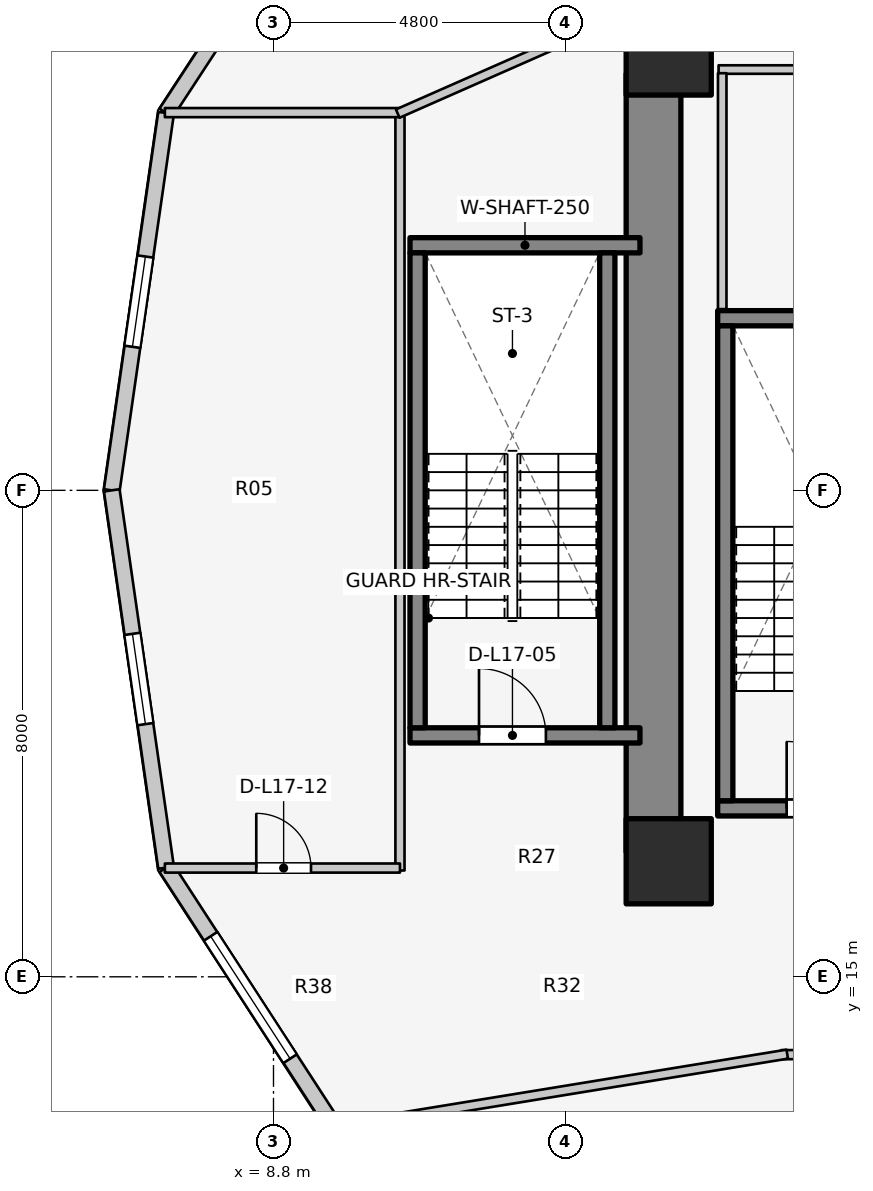
"""IFC4 building model, lengths in metres.
Left out: names, types, materials, properties, quantities, classifications, styles, units other than length and angle.
Written with IfcOpenShell. Run it as: python <this file> out.ifc"""

import sys

from ifc_helpers import new_model, si_unit, direction, frame, frame_2d, origin, origin_2d, place, context, subcontext, project, spatial, rectangle, extrude, element, fill, save


model = new_model("IFC4")
c1 = context("Model", 3, precision=1e-05, world=origin(), true_north=direction((0.0, 1.0)))
c2 = subcontext(c1, "Body", "Model", "MODEL_VIEW")
j1 = project(units=[si_unit("LENGTHUNIT", "METRE"), si_unit("PLANEANGLEUNIT", "RADIAN")], contexts=[c1])
p1 = place(None, origin())
s1 = spatial("IfcSite", under=j1, at=p1, CompositionType="ELEMENT")
p2 = place(p1, origin())
s2 = spatial("IfcBuilding", under=s1, at=p2, CompositionType="ELEMENT")
p3 = place(p2, frame((0.0, 0.0, 58.6)))
s3 = spatial("IfcBuildingStorey", under=s2, at=p3, CompositionType="ELEMENT", Elevation=58.6)
p4 = place(p3, frame((15.05, 17.05, 0.0), z_axis=(0.0, 0.0, 1.0), x_axis=(0.0, 1.0, 0.0)))
e1 = element("IfcWall", 1, at=p4, inside=s3, PredefinedType="SHEAR", context=c2, shape_type="SweptSolid", body=[
    extrude(rectangle(XDim=12.8, YDim=0.9, at=frame_2d((6.4, 0.0))), origin(), (0.0, 0.0, 1.0), 3.1),
])
p5 = place(p3, frame((16.105, 17.77, 0.0), z_axis=(0.0, 0.0, 1.0), x_axis=(1.0, 0.0, 0.0)))
e2 = element("IfcWall", 2, at=p5, inside=s3, PredefinedType="SOLIDWALL", context=c2, shape_type="SweptSolid", body=[
    extrude(rectangle(XDim=3.37, YDim=0.25, at=frame_2d((1.685, 0.0))), origin(), (0.0, 0.0, 1.0), 3.1),
])
p6 = place(p5, frame((1.135, 0.0, 0.0)))
e3 = element("IfcOpeningElement", 3, at=p6, cuts=e2, PredefinedType="OPENING", context=c2, shape_type="SweptSolid", body=[
    extrude(rectangle(XDim=1.1, YDim=2.1, at=frame_2d((0.55, 1.05))), frame((0.0, 0.135, 0.0), z_axis=(0.0, -1.0, 0.0), x_axis=(1.0, 0.0, 0.0)), (0.0, 0.0, 1.0), 0.27),
])
p7 = place(p3, frame((16.105, 25.83, 0.0), z_axis=(0.0, 0.0, 1.0), x_axis=(1.0, 0.0, 0.0)))
e4 = element("IfcWall", 4, at=p7, inside=s3, PredefinedType="SOLIDWALL", context=c2, shape_type="SweptSolid", body=[
    extrude(rectangle(XDim=3.37, YDim=0.25, at=frame_2d((1.685, 0.0))), origin(), (0.0, 0.0, 1.0), 3.1),
])
p8 = place(p3, frame((16.23, 17.895, 0.0), z_axis=(0.0, 0.0, 1.0), x_axis=(0.0, 1.0, 0.0)))
e5 = element("IfcWall", 5, at=p8, inside=s3, PredefinedType="SOLIDWALL", context=c2, shape_type="SweptSolid", body=[
    extrude(rectangle(XDim=7.81, YDim=0.25, at=frame_2d((3.905, 0.0))), origin(), (0.0, 0.0, 1.0), 3.1),
])
p9 = place(p3, frame((11.045, 18.97, 0.0), z_axis=(0.0, 0.0, 1.0), x_axis=(1.0, 0.0, 0.0)))
e6 = element("IfcWall", 6, at=p9, inside=s3, PredefinedType="SOLIDWALL", context=c2, shape_type="SweptSolid", body=[
    extrude(rectangle(XDim=3.782, YDim=0.25, at=frame_2d((1.891, 0.0))), origin(), (0.0, 0.0, 1.0), 3.1),
])
p10 = place(p9, frame((1.135, 0.0, 0.0)))
e7 = element("IfcOpeningElement", 7, at=p10, cuts=e6, PredefinedType="OPENING", context=c2, shape_type="SweptSolid", body=[
    extrude(rectangle(XDim=1.1, YDim=2.1, at=frame_2d((0.55, 1.05))), frame((0.0, 0.135, 0.0), z_axis=(0.0, -1.0, 0.0), x_axis=(1.0, 0.0, 0.0)), (0.0, 0.0, 1.0), 0.27),
])
p11 = place(p3, frame((11.045, 27.03, 0.0), z_axis=(0.0, 0.0, 1.0), x_axis=(1.0, 0.0, 0.0)))
e8 = element("IfcWall", 8, at=p11, inside=s3, PredefinedType="SOLIDWALL", context=c2, shape_type="SweptSolid", body=[
    extrude(rectangle(XDim=3.782, YDim=0.25, at=frame_2d((1.891, 0.0))), origin(), (0.0, 0.0, 1.0), 3.1),
])
for number, where, z_axis, x_axis in (
    (9, (11.17, 19.095, 0.0), (0.0, 0.0, 1.0), (0.0, 1.0, 0.0)),
    (10, (14.29, 19.095, 0.0), (0.0, 0.0, 1.0), (0.0, 1.0, 0.0)),
):
    element("IfcWall", number, at=place(p3, frame(where, z_axis=z_axis, x_axis=x_axis)), inside=s3, PredefinedType="SOLIDWALL", context=c2, shape_type="SweptSolid", body=[
        extrude(rectangle(XDim=7.81, YDim=0.25, at=frame_2d((3.905, 0.0))), origin(), (0.0, 0.0, 1.0), 3.1),
    ])
for number, where, z_axis, x_axis in (
    (11, (15.3, 16.9, 0.0), (0.0, 0.0, 1.0), (1.0, 0.0, 0.0)),
    (12, (15.3, 30.2, 0.0), (0.0, 0.0, 1.0), (1.0, 0.0, 0.0)),
):
    element("IfcColumn", number, at=place(p3, frame(where, z_axis=z_axis, x_axis=x_axis)), inside=s3, PredefinedType="COLUMN", context=c2, shape_type="SweptSolid", body=[
        extrude(rectangle(XDim=1.4, YDim=1.4, at=origin_2d()), origin(), (0.0, 0.0, 1.0), 3.1),
    ])
p12 = place(p3, frame((9.806, 33.441, 0.0), z_axis=(0.0, 0.0, 1.0), x_axis=(-0.547702757047, -0.836672988642, 0.0)))
e13 = element("IfcWall", 13, at=p12, inside=s3, PredefinedType="STANDARD", context=c2, shape_type="SweptSolid", body=[
    extrude(rectangle(XDim=5.062, YDim=0.26, at=frame_2d((2.531, 0.0))), origin(), (0.0, 0.0, 1.0), 2.85),
])
p13 = place(p12, frame((1.331, 0.0, 0.75)))
e14 = element("IfcOpeningElement", 14, at=p13, cuts=e13, PredefinedType="OPENING", context=c2, shape_type="SweptSolid", body=[
    extrude(rectangle(XDim=2.4, YDim=1.7, at=frame_2d((1.2, 0.85))), frame((0.0, 0.14, 0.0), z_axis=(0.0, -1.0, 0.0), x_axis=(1.0, 0.0, 0.0)), (0.0, 0.0, 1.0), 0.28),
])
p14 = place(p3, frame((7.033, 29.205, 0.0), z_axis=(0.0, 0.0, 1.0), x_axis=(-0.142528001686, -0.989790770181, 0.0)))
e15 = element("IfcWall", 15, at=p14, inside=s3, PredefinedType="STANDARD", context=c2, shape_type="SweptSolid", body=[
    extrude(rectangle(XDim=6.269, YDim=0.26, at=frame_2d((3.135, 0.0))), origin(), (0.0, 0.0, 1.0), 2.85),
])
p15 = place(p14, frame((2.385, 0.0, 0.75)))
e16 = element("IfcOpeningElement", 16, at=p15, cuts=e15, PredefinedType="OPENING", context=c2, shape_type="SweptSolid", body=[
    extrude(rectangle(XDim=1.5, YDim=1.6, at=frame_2d((0.75, 0.8))), frame((0.0, 0.14, 0.0), z_axis=(0.0, -1.0, 0.0), x_axis=(1.0, 0.0, 0.0)), (0.0, 0.0, 1.0), 0.28),
])
p16 = place(p3, frame((6.14, 23.0, 0.0), z_axis=(0.0, 0.0, 1.0), x_axis=(0.142528001686, -0.989790770181, 0.0)))
e17 = element("IfcWall", 17, at=p16, inside=s3, PredefinedType="STANDARD", context=c2, shape_type="SweptSolid", body=[
    extrude(rectangle(XDim=6.269, YDim=0.26, at=frame_2d((3.135, 0.0))), origin(), (0.0, 0.0, 1.0), 2.85),
])
p17 = place(p16, frame((2.385, 0.0, 0.75)))
e18 = element("IfcOpeningElement", 18, at=p17, cuts=e17, PredefinedType="OPENING", context=c2, shape_type="SweptSolid", body=[
    extrude(rectangle(XDim=1.5, YDim=1.6, at=frame_2d((0.75, 0.8))), frame((0.0, 0.14, 0.0), z_axis=(0.0, -1.0, 0.0), x_axis=(1.0, 0.0, 0.0)), (0.0, 0.0, 1.0), 0.28),
])
p18 = place(p3, frame((7.033, 16.795, 0.0), z_axis=(0.0, 0.0, 1.0), x_axis=(0.544578722263, -0.838709732421, 0.0)))
e19 = element("IfcWall", 19, at=p18, inside=s3, PredefinedType="STANDARD", context=c2, shape_type="SweptSolid", body=[
    extrude(rectangle(XDim=5.092, YDim=0.26, at=frame_2d((2.546, 0.0))), origin(), (0.0, 0.0, 1.0), 2.85),
])
p19 = place(p18, frame((1.346, 0.0, 0.75)))
e20 = element("IfcOpeningElement", 20, at=p19, cuts=e19, PredefinedType="OPENING", context=c2, shape_type="SweptSolid", body=[
    extrude(rectangle(XDim=2.4, YDim=1.7, at=frame_2d((1.2, 0.85))), frame((0.0, 0.14, 0.0), z_axis=(0.0, -1.0, 0.0), x_axis=(1.0, 0.0, 0.0)), (0.0, 0.0, 1.0), 0.28),
])
p20 = place(p3, frame((16.12, 29.92, 0.0), z_axis=(0.0, 0.0, 1.0), x_axis=(1.0, 0.0, 0.0)))
e21 = element("IfcWall", 21, at=p20, inside=s3, PredefinedType="PLUMBINGWALL", context=c2, shape_type="SweptSolid", body=[
    extrude(rectangle(XDim=3.3, YDim=0.14, at=frame_2d((1.65, 0.0))), origin(), (0.0, 0.0, 1.0), 2.855),
])
p21 = place(p20, frame((1.516, 0.0, 0.0)))
e22 = element("IfcOpeningElement", 22, at=p21, cuts=e21, PredefinedType="OPENING", context=c2, shape_type="SweptSolid", body=[
    extrude(rectangle(XDim=0.85, YDim=2.05, at=frame_2d((0.425, 1.025))), frame((0.0, 0.08, 0.0), z_axis=(0.0, -1.0, 0.0), x_axis=(1.0, 0.0, 0.0)), (0.0, 0.0, 1.0), 0.16),
])
p22 = place(p3, frame((16.18, 25.98, 0.0), z_axis=(0.0, 0.0, 1.0), x_axis=(0.0, 1.0, 0.0)))
e23 = element("IfcWall", 23, at=p22, inside=s3, PredefinedType="PLUMBINGWALL", context=c2, shape_type="SweptSolid", body=[
    extrude(rectangle(XDim=3.88, YDim=0.14, at=frame_2d((1.94, 0.0))), origin(), (0.0, 0.0, 1.0), 2.855),
])
p23 = place(p3, frame((10.88, 16.748, 0.0), z_axis=(0.0, 0.0, 1.0), x_axis=(0.0, 1.0, 0.0)))
e24 = element("IfcWall", 24, at=p23, inside=s3, PredefinedType="PARTITIONING", context=c2, shape_type="SweptSolid", body=[
    extrude(rectangle(XDim=12.503, YDim=0.15, at=frame_2d((6.252, 0.0))), origin(), (0.0, 0.0, 1.0), 2.12),
])
p24 = place(p3, frame((7.014, 16.788, 0.0), z_axis=(0.0, 0.0, 1.0), x_axis=(1.0, 0.0, 0.0)))
e25 = element("IfcWall", 25, at=p24, inside=s3, PredefinedType="PARTITIONING", context=c2, shape_type="SweptSolid", body=[
    extrude(rectangle(XDim=3.866, YDim=0.15, at=frame_2d((1.933, 0.0))), origin(), (0.0, 0.0, 1.0), 2.855),
])
p25 = place(p24, frame((1.503, 0.0, 0.0)))
e26 = element("IfcOpeningElement", 26, at=p25, cuts=e25, PredefinedType="OPENING", context=c2, shape_type="SweptSolid", body=[
    extrude(rectangle(XDim=0.9, YDim=2.1, at=frame_2d((0.45, 1.05))), frame((0.0, 0.085, 0.0), z_axis=(0.0, -1.0, 0.0), x_axis=(1.0, 0.0, 0.0)), (0.0, 0.0, 1.0), 0.17),
])
p26 = place(p3, frame((7.014, 29.212, 0.0), z_axis=(0.0, 0.0, 1.0), x_axis=(1.0, 0.0, 0.0)))
e27 = element("IfcWall", 27, at=p26, inside=s3, PredefinedType="PARTITIONING", context=c2, shape_type="SweptSolid", body=[
    extrude(rectangle(XDim=3.866, YDim=0.15, at=frame_2d((1.933, 0.0))), origin(), (0.0, 0.0, 1.0), 2.855),
])
p27 = place(p3, frame((10.844, 29.196, 0.0), z_axis=(0.0, 0.0, 1.0), x_axis=(0.91502756289, 0.403391322604, 0.0)))
e28 = element("IfcWall", 28, at=p27, inside=s3, PredefinedType="PARTITIONING", context=c2, shape_type="SweptSolid", body=[
    extrude(rectangle(XDim=4.637, YDim=0.15, at=frame_2d((2.319, 0.0))), origin(), (0.0, 0.0, 1.0), 2.069),
])
p28 = place(p3, frame((17.15, 13.72, 0.0), z_axis=(0.0, 0.0, 1.0), x_axis=(1.0, 0.0, 0.0)))
e29 = element("IfcWall", 29, at=p28, inside=s3, PredefinedType="PARTITIONING", context=c2, shape_type="SweptSolid", body=[
    extrude(rectangle(XDim=7.52, YDim=0.15, at=frame_2d((3.76, 0.0))), origin(), (0.0, 0.0, 1.0), 2.237),
])
p29 = place(p28, frame((1.3, 0.0, 0.0)))
e30 = element("IfcOpeningElement", 30, at=p29, cuts=e29, PredefinedType="OPENING", context=c2, shape_type="SweptSolid", body=[
    extrude(rectangle(XDim=0.9, YDim=2.1, at=frame_2d((0.45, 1.05))), frame((0.0, 0.085, 0.0), z_axis=(0.0, -1.0, 0.0), x_axis=(1.0, 0.0, 0.0)), (0.0, 0.0, 1.0), 0.17),
])
p30 = place(p3, frame((17.249, 13.728, 0.0), z_axis=(0.0, 0.0, 1.0), x_axis=(-0.98693078372, -0.161144742846, 0.0)))
e31 = element("IfcWall", 31, at=p30, inside=s3, PredefinedType="PARTITIONING", context=c2, shape_type="SweptSolid", body=[
    extrude(rectangle(XDim=7.557, YDim=0.15, at=frame_2d((3.779, 0.0))), origin(), (0.0, 0.0, 1.0), 2.069),
])
p31 = place(p15, origin())
e32 = element("IfcWindow", 32, at=p31, inside=s3, PartitioningType="SINGLE_PANEL", PredefinedType="WINDOW", context=c2, shape_type="SweptSolid", body=[
    extrude(rectangle(XDim=1.5, YDim=1.6, at=frame_2d((0.75, 0.8))), frame((0.0, 0.03, 0.0), z_axis=(0.0, -1.0, 0.0), x_axis=(1.0, 0.0, 0.0)), (0.0, 0.0, 1.0), 0.06),
])
fill(e16, e32)
p32 = place(p17, origin())
e33 = element("IfcWindow", 33, at=p32, inside=s3, PartitioningType="SINGLE_PANEL", PredefinedType="WINDOW", context=c2, shape_type="SweptSolid", body=[
    extrude(rectangle(XDim=1.5, YDim=1.6, at=frame_2d((0.75, 0.8))), frame((0.0, 0.03, 0.0), z_axis=(0.0, -1.0, 0.0), x_axis=(1.0, 0.0, 0.0)), (0.0, 0.0, 1.0), 0.06),
])
fill(e18, e33)
p33 = place(p19, origin())
e34 = element("IfcWindow", 34, at=p33, inside=s3, PartitioningType="SINGLE_PANEL", PredefinedType="WINDOW", context=c2, shape_type="SweptSolid", body=[
    extrude(rectangle(XDim=2.4, YDim=1.7, at=frame_2d((1.2, 0.85))), frame((0.0, 0.03, 0.0), z_axis=(0.0, -1.0, 0.0), x_axis=(1.0, 0.0, 0.0)), (0.0, 0.0, 1.0), 0.06),
])
fill(e20, e34)
p34 = place(p6, origin())
e35 = element("IfcDoor", 35, at=p34, inside=s3, OperationType="SINGLE_SWING_LEFT", PredefinedType="DOOR", context=c2, shape_type="SweptSolid", body=[
    extrude(rectangle(XDim=1.1, YDim=2.1, at=frame_2d((0.55, 1.05))), frame((0.0, 0.025, 0.0), z_axis=(0.0, -1.0, 0.0), x_axis=(1.0, 0.0, 0.0)), (0.0, 0.0, 1.0), 0.05),
])
fill(e3, e35)
p35 = place(p10, origin())
e36 = element("IfcDoor", 36, at=p35, inside=s3, OperationType="SINGLE_SWING_LEFT", PredefinedType="DOOR", context=c2, shape_type="SweptSolid", body=[
    extrude(rectangle(XDim=1.1, YDim=2.1, at=frame_2d((0.55, 1.05))), frame((0.0, 0.025, 0.0), z_axis=(0.0, -1.0, 0.0), x_axis=(1.0, 0.0, 0.0)), (0.0, 0.0, 1.0), 0.05),
])
fill(e7, e36)
p36 = place(p25, origin())
e37 = element("IfcDoor", 37, at=p36, inside=s3, OperationType="SINGLE_SWING_LEFT", PredefinedType="DOOR", context=c2, shape_type="SweptSolid", body=[
    extrude(rectangle(XDim=0.9, YDim=2.1, at=frame_2d((0.45, 1.05))), frame((0.0, 0.025, 0.0), z_axis=(0.0, -1.0, 0.0), x_axis=(1.0, 0.0, 0.0)), (0.0, 0.0, 1.0), 0.05),
])
fill(e26, e37)
save(model, sys.argv[1])
